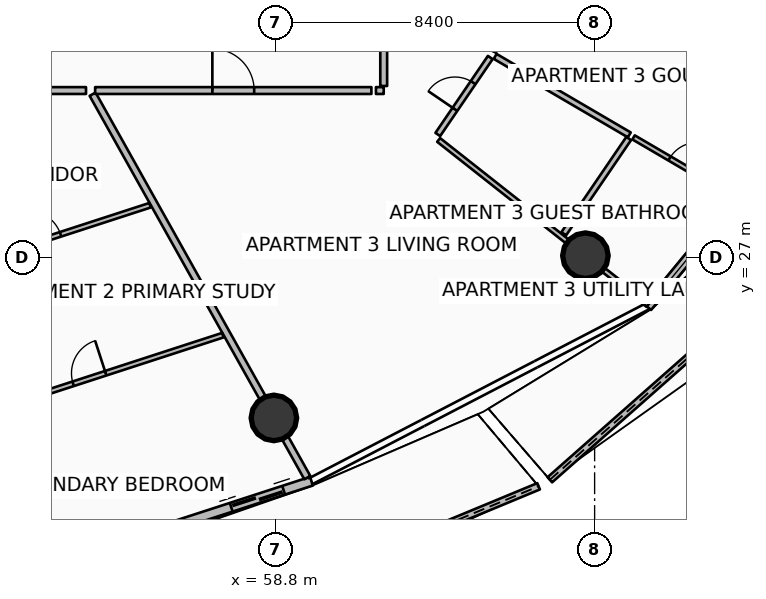
"""IFC4 building model, lengths in metres.
Left out: names, types, materials, properties, quantities, classifications, styles, units other than length and angle.
Written with IfcOpenShell. Run it as: python <this file> out.ifc"""

import sys

from ifc_helpers import new_model, si_unit, direction, frame, frame_2d, origin, origin_2d, place, context, subcontext, project, spatial, polyline, rectangle, circle, outline, extrude, element, fill, save


model = new_model("IFC4")
c1 = context("Model", 3, precision=1e-05, world=origin(), true_north=direction((0.0, 1.0)))
c2 = subcontext(c1, "Body", "Model", "MODEL_VIEW")
j1 = project(units=[si_unit("LENGTHUNIT", "METRE"), si_unit("PLANEANGLEUNIT", "RADIAN")], contexts=[c1])
p1 = place(None, origin())
s1 = spatial("IfcSite", under=j1, at=p1, CompositionType="ELEMENT")
p2 = place(p1, origin())
s2 = spatial("IfcBuilding", under=s1, at=p2, CompositionType="ELEMENT")
p3 = place(p2, frame((0.0, 0.0, 101.4)))
s3 = spatial("IfcBuildingStorey", under=s2, at=p3, CompositionType="ELEMENT", Elevation=101.4)
for number, where, z_axis, x_axis in (
    (1, (58.76, 22.786, 0.0), (0.0, 0.0, 1.0), (1.0, 0.0, 0.0)),
    (2, (66.958, 27.055, 0.0), (0.0, 0.0, 1.0), (1.0, 0.0, 0.0)),
):
    element("IfcColumn", number, at=place(p3, frame(where, z_axis=z_axis, x_axis=x_axis)), inside=s3, PredefinedType="COLUMN", context=c2, shape_type="SweptSolid", body=[
        extrude(circle(Radius=0.6, at=origin_2d()), origin(), (0.0, 0.0, 1.0), 3.5),
    ])
p4 = place(p3, frame((56.233, 17.05, 0.0), z_axis=(0.0, 0.0, 1.0), x_axis=(0.92370541506, 0.383103518894, 0.0)))
e3 = element("IfcWall", 3, at=p4, inside=s3, PredefinedType="PARAPET", context=c2, shape_type="SweptSolid", body=[
    extrude(outline(polyline([(0.0, 0.0), (10.277, 0.0), (10.277, 1.756), (5.139, 1.853), (0.0, 1.832), (0.0, 0.0)])), frame((0.0, 0.09, 0.0), z_axis=(0.0, -1.0, 0.0), x_axis=(1.0, 0.0, 0.0)), (0.0, 0.0, 1.0), 0.18),
])
p5 = place(p3, frame((66.022, 21.158, 0.0), z_axis=(0.0, 0.0, 1.0), x_axis=(0.749623748339, 0.661864212604, 0.0)))
e4 = element("IfcWall", 4, at=p5, inside=s3, PredefinedType="PARAPET", context=c2, shape_type="SweptSolid", body=[
    extrude(outline(polyline([(0.0, 0.0), (11.05, 0.0), (11.05, 1.348), (5.525, 1.562), (0.0, 1.747), (0.0, 0.0)])), frame((0.0, 0.09, 0.0), z_axis=(0.0, -1.0, 0.0), x_axis=(1.0, 0.0, 0.0)), (0.0, 0.0, 1.0), 0.18),
])
p6 = place(p3, frame((50.767, 18.203, 0.0), z_axis=(0.0, 0.0, 1.0), x_axis=(0.951052494852, 0.30902937083, 0.0)))
e5 = element("IfcWall", 5, at=p6, inside=s3, PredefinedType="SOLIDWALL", context=c2, shape_type="SweptSolid", body=[
    extrude(rectangle(XDim=9.444, YDim=0.24, at=frame_2d((4.722, 0.0))), origin(), (0.0, 0.0, 1.0), 2.45),
])
p7 = place(p6, frame((7.224, 0.0, 0.0)))
e6 = element("IfcOpeningElement", 6, at=p7, cuts=e5, PredefinedType="OPENING", context=c2, shape_type="SweptSolid", body=[
    extrude(rectangle(XDim=1.45, YDim=2.15, at=frame_2d((0.725, 1.075))), frame((0.0, 0.13, 0.0), z_axis=(0.0, -1.0, 0.0), x_axis=(1.0, 0.0, 0.0)), (0.0, 0.0, 1.0), 0.26),
])
p8 = place(p6, frame((0.28, 0.0, 0.65)))
e7 = element("IfcOpeningElement", 7, at=p8, cuts=e5, PredefinedType="OPENING", context=c2, shape_type="SweptSolid", body=[
    extrude(rectangle(XDim=1.6, YDim=1.5, at=frame_2d((0.8, 0.75))), frame((0.0, 0.13, 0.0), z_axis=(0.0, -1.0, 0.0), x_axis=(1.0, 0.0, 0.0)), (0.0, 0.0, 1.0), 0.26),
])
p9 = place(p3, frame((68.593, 25.702, 0.0), z_axis=(0.0, 0.0, 1.0), x_axis=(0.636704975, 0.771107498868, 0.0)))
e8 = element("IfcWall", 8, at=p9, inside=s3, PredefinedType="SOLIDWALL", context=c2, shape_type="SweptSolid", body=[
    extrude(rectangle(XDim=11.084, YDim=0.24, at=frame_2d((5.542, 0.0))), origin(), (0.0, 0.0, 1.0), 2.45),
])
p10 = place(p9, frame((8.864, 0.0, 0.0)))
e9 = element("IfcOpeningElement", 9, at=p10, cuts=e8, PredefinedType="OPENING", context=c2, shape_type="SweptSolid", body=[
    extrude(rectangle(XDim=1.45, YDim=2.15, at=frame_2d((0.725, 1.075))), frame((0.0, 0.13, 0.0), z_axis=(0.0, -1.0, 0.0), x_axis=(1.0, 0.0, 0.0)), (0.0, 0.0, 1.0), 0.26),
])
p11 = place(p9, frame((0.28, 0.0, 0.65)))
e10 = element("IfcOpeningElement", 10, at=p11, cuts=e8, PredefinedType="OPENING", context=c2, shape_type="SweptSolid", body=[
    extrude(rectangle(XDim=1.6, YDim=1.5, at=frame_2d((0.8, 0.75))), frame((0.0, 0.13, 0.0), z_axis=(0.0, -1.0, 0.0), x_axis=(1.0, 0.0, 0.0)), (0.0, 0.0, 1.0), 0.26),
])
p12 = place(p3, frame((53.99, 31.304, 0.0), z_axis=(0.0, 0.0, 1.0), x_axis=(0.488628442553, -0.872491974249, 0.0)))
e11 = element("IfcWall", 11, at=p12, inside=s3, PredefinedType="PARTITIONING", context=c2, shape_type="SweptSolid", body=[
    extrude(rectangle(XDim=11.563, YDim=0.18, at=frame_2d((5.782, 0.0))), origin(), (0.0, 0.0, 1.0), 2.94),
])
p13 = place(p3, frame((49.375, 31.4, 0.0), z_axis=(0.0, 0.0, 1.0), x_axis=(1.0, 0.0, 0.0)))
e12 = element("IfcWall", 12, at=p13, inside=s3, PredefinedType="PARTITIONING", context=c2, shape_type="SweptSolid", body=[
    extrude(rectangle(XDim=4.442, YDim=0.18, at=frame_2d((2.221, 0.0))), origin(), (0.0, 0.0, 1.0), 2.94),
])
p14 = place(p3, frame((49.934, 26.574, 0.0), z_axis=(0.0, 0.0, 1.0), x_axis=(0.951057969744, 0.309012521082, 0.0)))
e13 = element("IfcWall", 13, at=p14, inside=s3, PredefinedType="PARTITIONING", context=c2, shape_type="SweptSolid", body=[
    extrude(rectangle(XDim=5.854, YDim=0.125, at=frame_2d((2.927, 0.0))), origin(), (0.0, 0.0, 1.0), 2.94),
])
p15 = place(p14, frame((2.477, 0.0, 0.0)))
e14 = element("IfcOpeningElement", 14, at=p15, cuts=e13, PredefinedType="OPENING", context=c2, shape_type="SweptSolid", body=[
    extrude(rectangle(XDim=0.9, YDim=2.08, at=frame_2d((0.45, 1.04))), frame((0.0, 0.073, 0.0), z_axis=(0.0, -1.0, 0.0), x_axis=(1.0, 0.0, 0.0)), (0.0, 0.0, 1.0), 0.145),
])
p16 = place(p3, frame((50.395, 22.682, 0.0), z_axis=(0.0, 0.0, 1.0), x_axis=(0.951062980527, 0.308997098808, 0.0)))
e15 = element("IfcWall", 15, at=p16, inside=s3, PredefinedType="PARTITIONING", context=c2, shape_type="SweptSolid", body=[
    extrude(rectangle(XDim=7.384, YDim=0.125, at=frame_2d((3.692, 0.0))), origin(), (0.0, 0.0, 1.0), 2.94),
])
p17 = place(p16, frame((3.242, 0.0, 0.0)))
e16 = element("IfcOpeningElement", 16, at=p17, cuts=e15, PredefinedType="OPENING", context=c2, shape_type="SweptSolid", body=[
    extrude(rectangle(XDim=0.9, YDim=2.08, at=frame_2d((0.45, 1.04))), frame((0.0, 0.073, 0.0), z_axis=(0.0, -1.0, 0.0), x_axis=(1.0, 0.0, 0.0)), (0.0, 0.0, 1.0), 0.145),
])
p18 = place(p3, frame((54.056, 31.4, 0.0), z_axis=(0.0, 0.0, 1.0), x_axis=(1.0, 0.0, 0.0)))
e17 = element("IfcWall", 17, at=p18, inside=s3, PredefinedType="PARTITIONING", context=c2, shape_type="SweptSolid", body=[
    extrude(rectangle(XDim=7.27, YDim=0.18, at=frame_2d((3.635, 0.0))), origin(), (0.0, 0.0, 1.0), 2.94),
])
p19 = place(p18, frame((3.085, 0.0, 0.0)))
e18 = element("IfcOpeningElement", 18, at=p19, cuts=e17, PredefinedType="OPENING", context=c2, shape_type="SweptSolid", body=[
    extrude(rectangle(XDim=1.1, YDim=2.1, at=frame_2d((0.55, 1.05))), frame((0.0, 0.1, 0.0), z_axis=(0.0, -1.0, 0.0), x_axis=(1.0, 0.0, 0.0)), (0.0, 0.0, 1.0), 0.2),
])
p20 = place(p3, frame((61.446, 31.4, 0.0), z_axis=(0.0, 0.0, 1.0), x_axis=(1.0, 0.0, 0.0)))
e19 = element("IfcWall", 19, at=p20, inside=s3, PredefinedType="PARTITIONING", context=c2, shape_type="SweptSolid", body=[
    extrude(rectangle(XDim=0.204, YDim=0.18, at=frame_2d((0.102, 0.0))), origin(), (0.0, 0.0, 1.0), 2.94),
])
p21 = place(p3, frame((61.65, 31.52, 0.0), z_axis=(0.0, 0.0, 1.0), x_axis=(0.0, 1.0, 0.0)))
e20 = element("IfcWall", 20, at=p21, inside=s3, PredefinedType="PARTITIONING", context=c2, shape_type="SweptSolid", body=[
    extrude(rectangle(XDim=6.51, YDim=0.18, at=frame_2d((3.255, 0.0))), origin(), (0.0, 0.0, 1.0), 2.94),
])
p22 = place(p3, frame((63.095, 30.1, 0.0), z_axis=(0.0, 0.0, 1.0), x_axis=(0.78530300145, -0.6191116183, 0.0)))
e21 = element("IfcWall", 21, at=p22, inside=s3, PredefinedType="PARTITIONING", context=c2, shape_type="SweptSolid", body=[
    extrude(rectangle(XDim=7.016, YDim=0.125, at=frame_2d((3.508, 0.0))), origin(), (0.0, 0.0, 1.0), 2.94),
])
p23 = place(p3, frame((63.073, 30.244, 0.0), z_axis=(0.0, 0.0, 1.0), x_axis=(0.563472809808, 0.826134609254, 0.0)))
e22 = element("IfcWall", 22, at=p23, inside=s3, PredefinedType="PARTITIONING", context=c2, shape_type="SweptSolid", body=[
    extrude(rectangle(XDim=2.451, YDim=0.15, at=frame_2d((1.226, 0.0))), origin(), (0.0, 0.0, 1.0), 2.94),
])
p24 = place(p23, frame((0.801, 0.0, 0.0)))
e23 = element("IfcOpeningElement", 23, at=p24, cuts=e22, PredefinedType="OPENING", context=c2, shape_type="SweptSolid", body=[
    extrude(rectangle(XDim=0.85, YDim=2.06, at=frame_2d((0.425, 1.03))), frame((0.0, 0.085, 0.0), z_axis=(0.0, -1.0, 0.0), x_axis=(1.0, 0.0, 0.0)), (0.0, 0.0, 1.0), 0.17),
])
p25 = place(p3, frame((66.387, 27.632, 0.0), z_axis=(0.0, 0.0, 1.0), x_axis=(0.563341818284, 0.826223938029, 0.0)))
e24 = element("IfcWall", 24, at=p25, inside=s3, PredefinedType="PARTITIONING", context=c2, shape_type="SweptSolid", body=[
    extrude(rectangle(XDim=3.034, YDim=0.15, at=frame_2d((1.517, 0.0))), origin(), (0.0, 0.0, 1.0), 2.94),
])
p26 = place(p3, frame((64.583, 32.298, 0.0), z_axis=(0.0, 0.0, 1.0), x_axis=(0.863128698129, -0.504984010109, 0.0)))
e25 = element("IfcWall", 25, at=p26, inside=s3, PredefinedType="PARTITIONING", context=c2, shape_type="SweptSolid", body=[
    extrude(rectangle(XDim=4.09, YDim=0.15, at=frame_2d((2.045, 0.0))), origin(), (0.0, 0.0, 1.0), 2.94),
])
p27 = place(p3, frame((68.225, 30.167, 0.0), z_axis=(0.0, 0.0, 1.0), x_axis=(0.863132180625, -0.504978057711, 0.0)))
e26 = element("IfcWall", 26, at=p27, inside=s3, PredefinedType="PARTITIONING", context=c2, shape_type="SweptSolid", body=[
    extrude(rectangle(XDim=3.043, YDim=0.125, at=frame_2d((1.521, 0.0))), origin(), (0.0, 0.0, 1.0), 2.94),
])
p28 = place(p27, frame((1.096, 0.0, 0.0)))
e27 = element("IfcOpeningElement", 27, at=p28, cuts=e26, PredefinedType="OPENING", context=c2, shape_type="SweptSolid", body=[
    extrude(rectangle(XDim=0.85, YDim=2.06, at=frame_2d((0.425, 1.03))), frame((0.0, 0.073, 0.0), z_axis=(0.0, -1.0, 0.0), x_axis=(1.0, 0.0, 0.0)), (0.0, 0.0, 1.0), 0.145),
])
p29 = place(p3, frame((65.746, 34.639, 0.0), z_axis=(0.0, 0.0, 1.0), x_axis=(0.923687629783, -0.383146398373, 0.0)))
e28 = element("IfcWall", 28, at=p29, inside=s3, PredefinedType="PARTITIONING", context=c2, shape_type="SweptSolid", body=[
    extrude(rectangle(XDim=8.122, YDim=0.125, at=frame_2d((4.061, 0.0))), origin(), (0.0, 0.0, 1.0), 2.94),
])
p30 = place(p3, frame((64.545, 32.424, 0.0), z_axis=(0.0, 0.0, 1.0), x_axis=(0.445043296976, 0.895509052895, 0.0)))
e29 = element("IfcWall", 29, at=p30, inside=s3, PredefinedType="PARTITIONING", context=c2, shape_type="SweptSolid", body=[
    extrude(rectangle(XDim=2.431, YDim=0.125, at=frame_2d((1.216, 0.0))), origin(), (0.0, 0.0, 1.0), 2.94),
])
p31 = place(p30, frame((0.791, 0.0, 0.0)))
e30 = element("IfcOpeningElement", 30, at=p31, cuts=e29, PredefinedType="OPENING", context=c2, shape_type="SweptSolid", body=[
    extrude(rectangle(XDim=0.85, YDim=2.06, at=frame_2d((0.425, 1.03))), frame((0.0, 0.073, 0.0), z_axis=(0.0, -1.0, 0.0), x_axis=(1.0, 0.0, 0.0)), (0.0, 0.0, 1.0), 0.145),
])
p32 = place(p7, origin())
e31 = element("IfcDoor", 31, at=p32, inside=s3, OperationType="DOUBLE_DOOR_SLIDING", PredefinedType="DOOR", context=c2, shape_type="SweptSolid", body=[
    extrude(rectangle(XDim=1.45, YDim=2.15, at=frame_2d((0.725, 1.075))), frame((0.0, 0.025, 0.0), z_axis=(0.0, -1.0, 0.0), x_axis=(1.0, 0.0, 0.0)), (0.0, 0.0, 1.0), 0.05),
])
fill(e6, e31)
p33 = place(p11, origin())
e32 = element("IfcWindow", 32, at=p33, inside=s3, PartitioningType="SINGLE_PANEL", PredefinedType="WINDOW", context=c2, shape_type="SweptSolid", body=[
    extrude(rectangle(XDim=1.6, YDim=1.5, at=frame_2d((0.8, 0.75))), frame((0.0, 0.03, 0.0), z_axis=(0.0, -1.0, 0.0), x_axis=(1.0, 0.0, 0.0)), (0.0, 0.0, 1.0), 0.06),
])
fill(e10, e32)
p34 = place(p15, origin())
e33 = element("IfcDoor", 33, at=p34, inside=s3, OperationType="SINGLE_SWING_LEFT", PredefinedType="DOOR", context=c2, shape_type="SweptSolid", body=[
    extrude(rectangle(XDim=0.9, YDim=2.08, at=frame_2d((0.45, 1.04))), frame((0.0, 0.025, 0.0), z_axis=(0.0, -1.0, 0.0), x_axis=(1.0, 0.0, 0.0)), (0.0, 0.0, 1.0), 0.05),
])
fill(e14, e33)
p35 = place(p17, origin())
e34 = element("IfcDoor", 34, at=p35, inside=s3, OperationType="SINGLE_SWING_RIGHT", PredefinedType="DOOR", context=c2, shape_type="SweptSolid", body=[
    extrude(rectangle(XDim=0.9, YDim=2.08, at=frame_2d((0.45, 1.04))), frame((0.0, 0.025, 0.0), z_axis=(0.0, -1.0, 0.0), x_axis=(1.0, 0.0, 0.0)), (0.0, 0.0, 1.0), 0.05),
])
fill(e16, e34)
p36 = place(p19, origin())
e35 = element("IfcDoor", 35, at=p36, inside=s3, OperationType="SINGLE_SWING_LEFT", PredefinedType="DOOR", context=c2, shape_type="SweptSolid", body=[
    extrude(rectangle(XDim=1.1, YDim=2.1, at=frame_2d((0.55, 1.05))), frame((0.0, 0.025, 0.0), z_axis=(0.0, -1.0, 0.0), x_axis=(1.0, 0.0, 0.0)), (0.0, 0.0, 1.0), 0.05),
])
fill(e18, e35)
p37 = place(p24, origin())
e36 = element("IfcDoor", 36, at=p37, inside=s3, OperationType="SINGLE_SWING_LEFT", PredefinedType="DOOR", context=c2, shape_type="SweptSolid", body=[
    extrude(rectangle(XDim=0.85, YDim=2.06, at=frame_2d((0.425, 1.03))), frame((0.0, 0.025, 0.0), z_axis=(0.0, -1.0, 0.0), x_axis=(1.0, 0.0, 0.0)), (0.0, 0.0, 1.0), 0.05),
])
fill(e23, e36)
p38 = place(p28, origin())
e37 = element("IfcDoor", 37, at=p38, inside=s3, OperationType="SINGLE_SWING_RIGHT", PredefinedType="DOOR", context=c2, shape_type="SweptSolid", body=[
    extrude(rectangle(XDim=0.85, YDim=2.06, at=frame_2d((0.425, 1.03))), frame((0.0, 0.025, 0.0), z_axis=(0.0, -1.0, 0.0), x_axis=(1.0, 0.0, 0.0)), (0.0, 0.0, 1.0), 0.05),
])
fill(e27, e37)
save(model, sys.argv[1])
